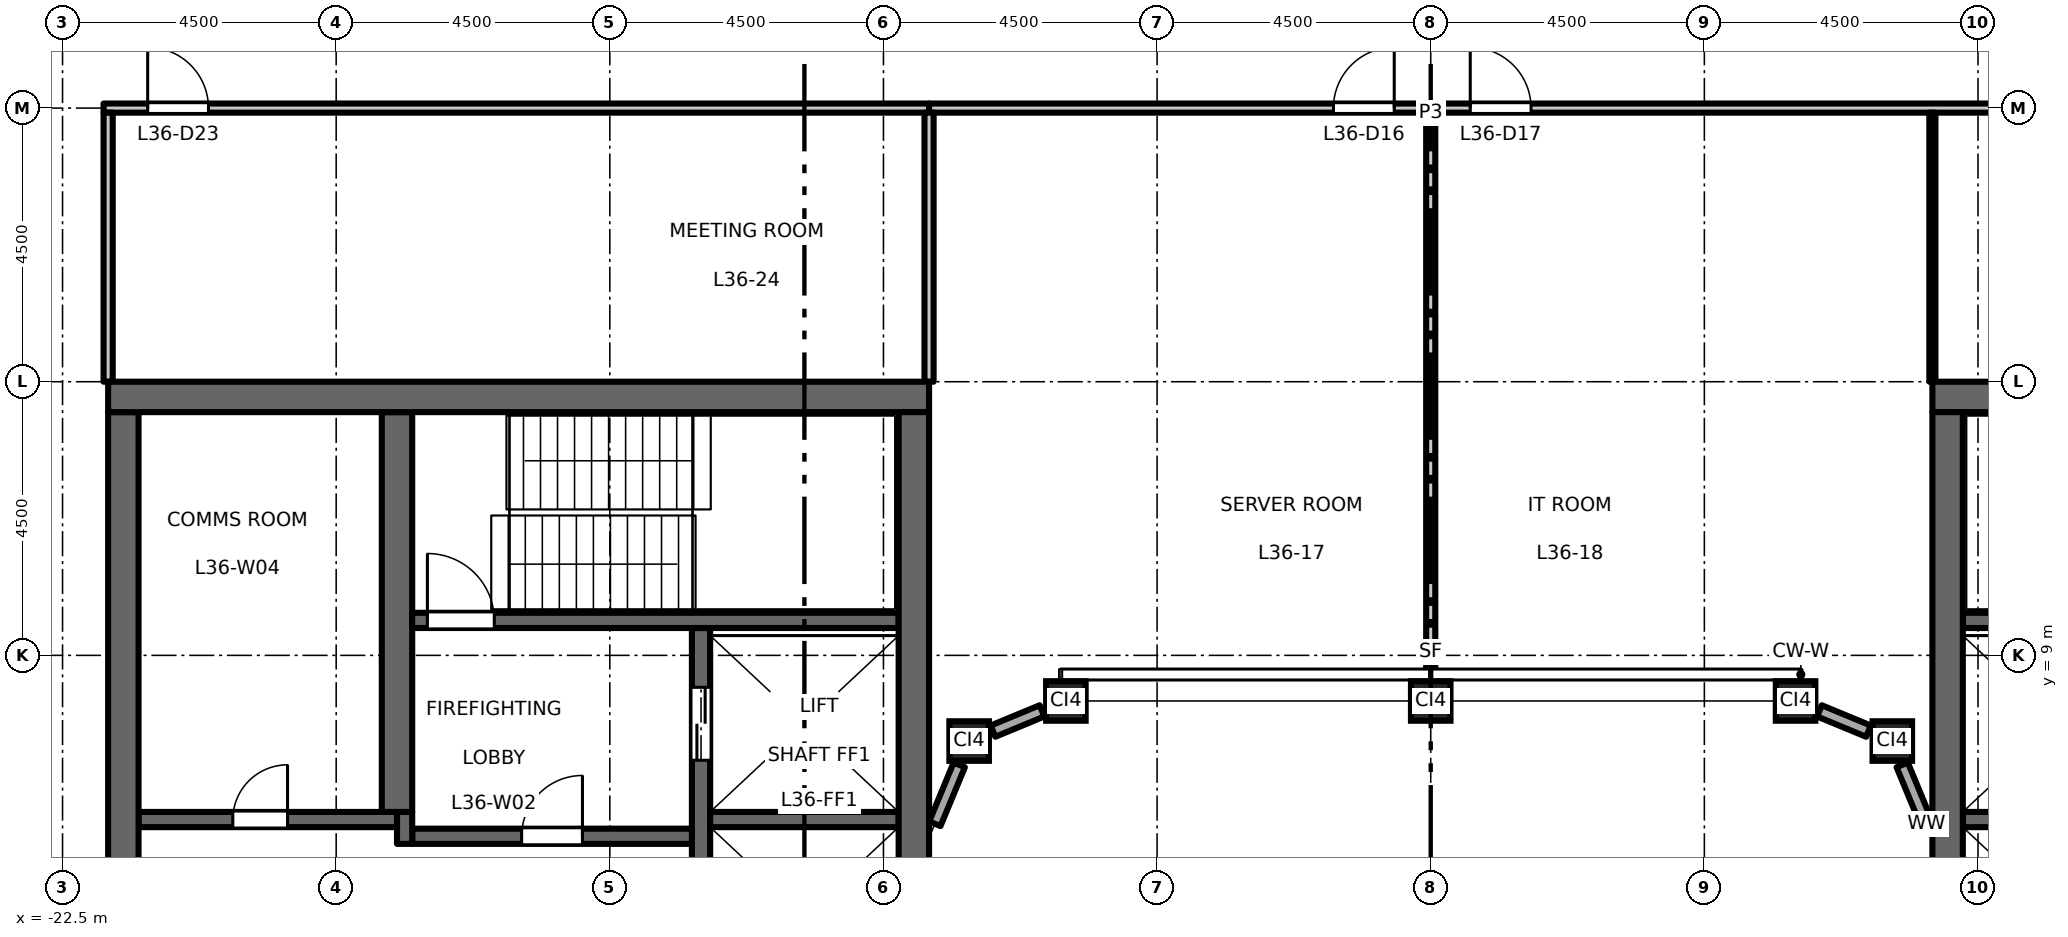
"""IFC4 building model, lengths in metres.
Left out: names, types, materials, properties, quantities, classifications, styles, units other than length and angle.
Written with IfcOpenShell. Run it as: python <this file> out.ifc"""

import sys

from ifc_helpers import new_model, si_unit, direction, frame, frame_2d, origin, origin_2d, place, context, subcontext, project, spatial, rectangle, hollow_rectangle, extrude, element, fill, save


model = new_model("IFC4")
c1 = context("Model", 3, precision=1e-05, world=origin(), true_north=direction((0.0, 1.0)))
c2 = subcontext(c1, "Body", "Model", "MODEL_VIEW")
j1 = project(units=[si_unit("LENGTHUNIT", "METRE"), si_unit("PLANEANGLEUNIT", "RADIAN")], contexts=[c1])
p1 = place(None, origin())
s1 = spatial("IfcSite", under=j1, at=p1, CompositionType="ELEMENT")
p2 = place(p1, origin())
s2 = spatial("IfcBuilding", under=s1, at=p2, CompositionType="ELEMENT")
p3 = place(p2, frame((0.0, 0.0, 167.7)))
s3 = spatial("IfcBuildingStorey", under=s2, at=p3, CompositionType="ELEMENT", Elevation=167.7)
for number, where, z_axis, x_axis in (
    (1, (-7.591, 7.591, 0.0), (0.0, 0.0, 1.0), (1.0, 0.0, 0.0)),
    (2, (-6.0, 8.25, 0.0), (0.0, 0.0, 1.0), (1.0, 0.0, 0.0)),
    (3, (0.0, 8.25, 0.0), (0.0, 0.0, 1.0), (1.0, 0.0, 0.0)),
    (4, (6.0, 8.25, 0.0), (0.0, 0.0, 1.0), (1.0, 0.0, 0.0)),
    (5, (7.591, 7.591, 0.0), (0.0, 0.0, 1.0), (1.0, 0.0, 0.0)),
):
    element("IfcColumn", number, at=place(p3, frame(where, z_axis=z_axis, x_axis=x_axis)), inside=s3, PredefinedType="COLUMN", context=c2, shape_type="SweptSolid", body=[
        extrude(hollow_rectangle(XDim=0.65, YDim=0.65, WallThickness=0.036, at=origin_2d()), origin(), (0.0, 0.0, 1.0), 4.5),
    ])
p4 = place(p3, frame((-12.0, -9.45, 0.0), z_axis=(0.0, 0.0, 1.0), x_axis=(0.0, 1.0, 0.0)))
e6 = element("IfcWall", 6, at=p4, inside=s3, PredefinedType="SHEAR", context=c2, shape_type="SweptSolid", body=[
    extrude(rectangle(XDim=18.9, YDim=0.3, at=frame_2d((9.45, 0.0))), origin(), (0.0, 0.0, 1.0), 4.35),
])
p5 = place(p4, frame((3.625, 0.0, 0.0)))
e7 = element("IfcOpeningElement", 7, at=p5, cuts=e6, PredefinedType="OPENING", context=c2, shape_type="SweptSolid", body=[
    extrude(rectangle(XDim=1.1, YDim=2.1, at=frame_2d((0.55, 1.05))), frame((0.0, 0.16, 0.0), z_axis=(0.0, -1.0, 0.0), x_axis=(1.0, 0.0, 0.0)), (0.0, 0.0, 1.0), 0.32),
])
p6 = place(p4, frame((6.775, 0.0, 0.0)))
e8 = element("IfcOpeningElement", 8, at=p6, cuts=e6, PredefinedType="OPENING", context=c2, shape_type="SweptSolid", body=[
    extrude(rectangle(XDim=1.1, YDim=2.1, at=frame_2d((0.55, 1.05))), frame((0.0, 0.16, 0.0), z_axis=(0.0, -1.0, 0.0), x_axis=(1.0, 0.0, 0.0)), (0.0, 0.0, 1.0), 0.32),
])
p7 = place(p4, frame((9.925, 0.0, 0.0)))
e9 = element("IfcOpeningElement", 9, at=p7, cuts=e6, PredefinedType="OPENING", context=c2, shape_type="SweptSolid", body=[
    extrude(rectangle(XDim=1.1, YDim=2.1, at=frame_2d((0.55, 1.05))), frame((0.0, 0.16, 0.0), z_axis=(0.0, -1.0, 0.0), x_axis=(1.0, 0.0, 0.0)), (0.0, 0.0, 1.0), 0.32),
])
p8 = place(p4, frame((13.075, 0.0, 0.0)))
e10 = element("IfcOpeningElement", 10, at=p8, cuts=e6, PredefinedType="OPENING", context=c2, shape_type="SweptSolid", body=[
    extrude(rectangle(XDim=1.1, YDim=2.1, at=frame_2d((0.55, 1.05))), frame((0.0, 0.16, 0.0), z_axis=(0.0, -1.0, 0.0), x_axis=(1.0, 0.0, 0.0)), (0.0, 0.0, 1.0), 0.32),
])
p9 = place(p4, frame((16.725, 0.0, 0.0)))
e11 = element("IfcOpeningElement", 11, at=p9, cuts=e6, PredefinedType="OPENING", context=c2, shape_type="SweptSolid", body=[
    extrude(rectangle(XDim=1.2, YDim=2.1, at=frame_2d((0.6, 1.05))), frame((0.0, 0.16, 0.0), z_axis=(0.0, -1.0, 0.0), x_axis=(1.0, 0.0, 0.0)), (0.0, 0.0, 1.0), 0.32),
])
p10 = place(p4, frame((0.975, 0.0, 0.0)))
e12 = element("IfcOpeningElement", 12, at=p10, cuts=e6, PredefinedType="OPENING", context=c2, shape_type="SweptSolid", body=[
    extrude(rectangle(XDim=1.2, YDim=2.1, at=frame_2d((0.6, 1.05))), frame((0.0, 0.16, 0.0), z_axis=(0.0, -1.0, 0.0), x_axis=(1.0, 0.0, 0.0)), (0.0, 0.0, 1.0), 0.32),
])
p11 = place(p3, frame((-12.15, 6.025, 0.0), z_axis=(0.0, 0.0, 1.0), x_axis=(-1.0, 0.0, 0.0)))
e13 = element("IfcWall", 13, at=p11, inside=s3, PredefinedType="SHEAR", context=c2, shape_type="SweptSolid", body=[
    extrude(rectangle(XDim=4.6, YDim=0.25, at=frame_2d((2.3, 0.0))), origin(), (0.0, 0.0, 1.0), 4.35),
])
p12 = place(p11, frame((1.8, 0.0, 0.0)))
e14 = element("IfcOpeningElement", 14, at=p12, cuts=e13, PredefinedType="OPENING", context=c2, shape_type="SweptSolid", body=[
    extrude(rectangle(XDim=1.0, YDim=2.1, at=frame_2d((0.5, 1.05))), frame((0.0, 0.135, 0.0), z_axis=(0.0, -1.0, 0.0), x_axis=(1.0, 0.0, 0.0)), (0.0, 0.0, 1.0), 0.27),
])
p13 = place(p3, frame((-16.875, 5.9, 0.0), z_axis=(0.0, 0.0, 1.0), x_axis=(0.0, 1.0, 0.0)))
e15 = element("IfcWall", 15, at=p13, inside=s3, PredefinedType="SHEAR", context=c2, shape_type="SweptSolid", body=[
    extrude(rectangle(XDim=0.525, YDim=0.25, at=frame_2d((0.263, 0.0))), origin(), (0.0, 0.0, 1.0), 4.35),
])
p14 = place(p3, frame((-17.0, 6.3, 0.0), z_axis=(0.0, 0.0, 1.0), x_axis=(-1.0, 0.0, 0.0)))
e16 = element("IfcWall", 16, at=p14, inside=s3, PredefinedType="SHEAR", context=c2, shape_type="SweptSolid", body=[
    extrude(rectangle(XDim=4.25, YDim=0.25, at=frame_2d((2.125, 0.0))), origin(), (0.0, 0.0, 1.0), 4.35),
])
p15 = place(p14, frame((1.8, 0.0, 0.0)))
e17 = element("IfcOpeningElement", 17, at=p15, cuts=e16, PredefinedType="OPENING", context=c2, shape_type="SweptSolid", body=[
    extrude(rectangle(XDim=0.9, YDim=2.1, at=frame_2d((0.45, 1.05))), frame((0.0, 0.135, 0.0), z_axis=(0.0, -1.0, 0.0), x_axis=(1.0, 0.0, 0.0)), (0.0, 0.0, 1.0), 0.27),
])
p16 = place(p3, frame((-21.5, -13.0, 0.0), z_axis=(0.0, 0.0, 1.0), x_axis=(0.0, 1.0, 0.0)))
e18 = element("IfcWall", 18, at=p16, inside=s3, PredefinedType="SHEAR", context=c2, shape_type="SweptSolid", body=[
    extrude(rectangle(XDim=26.0, YDim=0.5, at=frame_2d((13.0, 0.0))), origin(), (0.0, 0.0, 1.0), 4.35),
])
p17 = place(p16, frame((16.825, 0.0, 0.0)))
e19 = element("IfcOpeningElement", 19, at=p17, cuts=e18, PredefinedType="OPENING", context=c2, shape_type="SweptSolid", body=[
    extrude(rectangle(XDim=1.8, YDim=2.1, at=frame_2d((0.9, 1.05))), frame((0.0, 0.26, 0.0), z_axis=(0.0, -1.0, 0.0), x_axis=(1.0, 0.0, 0.0)), (0.0, 0.0, 1.0), 0.52),
])
p18 = place(p16, frame((7.375, 0.0, 0.0)))
e20 = element("IfcOpeningElement", 20, at=p18, cuts=e18, PredefinedType="OPENING", context=c2, shape_type="SweptSolid", body=[
    extrude(rectangle(XDim=1.8, YDim=2.1, at=frame_2d((0.9, 1.05))), frame((0.0, 0.26, 0.0), z_axis=(0.0, -1.0, 0.0), x_axis=(1.0, 0.0, 0.0)), (0.0, 0.0, 1.0), 0.52),
])
p19 = place(p16, frame((2.65, 0.0, 0.0)))
e21 = element("IfcOpeningElement", 21, at=p19, cuts=e18, PredefinedType="OPENING", context=c2, shape_type="SweptSolid", body=[
    extrude(rectangle(XDim=0.9, YDim=2.1, at=frame_2d((0.45, 1.05))), frame((0.0, 0.26, 0.0), z_axis=(0.0, -1.0, 0.0), x_axis=(1.0, 0.0, 0.0)), (0.0, 0.0, 1.0), 0.52),
])
p20 = place(p3, frame((-17.0, 6.425, 0.0), z_axis=(0.0, 0.0, 1.0), x_axis=(0.0, 1.0, 0.0)))
e22 = element("IfcWall", 22, at=p20, inside=s3, PredefinedType="SHEAR", context=c2, shape_type="SweptSolid", body=[
    extrude(rectangle(XDim=6.575, YDim=0.5, at=frame_2d((3.288, 0.0))), origin(), (0.0, 0.0, 1.0), 4.35),
])
p21 = place(p3, frame((-8.75, 6.3, 0.0), z_axis=(0.0, 0.0, 1.0), x_axis=(-1.0, 0.0, 0.0)))
e23 = element("IfcWall", 23, at=p21, inside=s3, PredefinedType="SHEAR", context=c2, shape_type="SweptSolid", body=[
    extrude(rectangle(XDim=3.1, YDim=0.25, at=frame_2d((1.55, 0.0))), origin(), (0.0, 0.0, 1.0), 4.35),
])
p22 = place(p3, frame((-8.75, 9.575, 0.0), z_axis=(0.0, 0.0, 1.0), x_axis=(-1.0, 0.0, 0.0)))
e24 = element("IfcWall", 24, at=p22, inside=s3, PredefinedType="SHEAR", context=c2, shape_type="SweptSolid", body=[
    extrude(rectangle(XDim=8.0, YDim=0.25, at=frame_2d((4.0, 0.0))), origin(), (0.0, 0.0, 1.0), 4.35),
])
p23 = place(p22, frame((6.65, 0.0, 0.0)))
e25 = element("IfcOpeningElement", 25, at=p23, cuts=e24, PredefinedType="OPENING", context=c2, shape_type="SweptSolid", body=[
    extrude(rectangle(XDim=1.1, YDim=2.1, at=frame_2d((0.55, 1.05))), frame((0.0, 0.135, 0.0), z_axis=(0.0, -1.0, 0.0), x_axis=(1.0, 0.0, 0.0)), (0.0, 0.0, 1.0), 0.27),
])
p24 = place(p3, frame((-8.25, 13.25, 0.0), z_axis=(0.0, 0.0, 1.0), x_axis=(-1.0, 0.0, 0.0)))
e26 = element("IfcWall", 26, at=p24, inside=s3, PredefinedType="SHEAR", context=c2, shape_type="SweptSolid", body=[
    extrude(rectangle(XDim=13.5, YDim=0.5, at=frame_2d((6.75, 0.0))), origin(), (0.0, 0.0, 1.0), 4.35),
])
p25 = place(p3, frame((-8.5, -13.0, 0.0), z_axis=(0.0, 0.0, 1.0), x_axis=(0.0, 1.0, 0.0)))
e27 = element("IfcWall", 27, at=p25, inside=s3, PredefinedType="SHEAR", context=c2, shape_type="SweptSolid", body=[
    extrude(rectangle(XDim=26.0, YDim=0.5, at=frame_2d((13.0, 0.0))), origin(), (0.0, 0.0, 1.0), 4.35),
])
p26 = place(p3, frame((8.75, 6.3, 0.0), z_axis=(0.0, 0.0, 1.0), x_axis=(1.0, 0.0, 0.0)))
e28 = element("IfcWall", 28, at=p26, inside=s3, PredefinedType="SHEAR", context=c2, shape_type="SweptSolid", body=[
    extrude(rectangle(XDim=3.1, YDim=0.25, at=frame_2d((1.55, 0.0))), origin(), (0.0, 0.0, 1.0), 4.35),
])
p27 = place(p3, frame((8.75, 9.575, 0.0), z_axis=(0.0, 0.0, 1.0), x_axis=(1.0, 0.0, 0.0)))
e29 = element("IfcWall", 29, at=p27, inside=s3, PredefinedType="SHEAR", context=c2, shape_type="SweptSolid", body=[
    extrude(rectangle(XDim=8.0, YDim=0.25, at=frame_2d((4.0, 0.0))), origin(), (0.0, 0.0, 1.0), 4.35),
])
p28 = place(p27, frame((6.65, 0.0, 0.0)))
e30 = element("IfcOpeningElement", 30, at=p28, cuts=e29, PredefinedType="OPENING", context=c2, shape_type="SweptSolid", body=[
    extrude(rectangle(XDim=1.1, YDim=2.1, at=frame_2d((0.55, 1.05))), frame((0.0, 0.135, 0.0), z_axis=(0.0, -1.0, 0.0), x_axis=(1.0, 0.0, 0.0)), (0.0, 0.0, 1.0), 0.27),
])
p29 = place(p3, frame((8.25, 13.25, 0.0), z_axis=(0.0, 0.0, 1.0), x_axis=(1.0, 0.0, 0.0)))
e31 = element("IfcWall", 31, at=p29, inside=s3, PredefinedType="SHEAR", context=c2, shape_type="SweptSolid", body=[
    extrude(rectangle(XDim=13.5, YDim=0.5, at=frame_2d((6.75, 0.0))), origin(), (0.0, 0.0, 1.0), 4.35),
])
p30 = place(p3, frame((8.5, -13.0, 0.0), z_axis=(0.0, 0.0, 1.0), x_axis=(0.0, 1.0, 0.0)))
e32 = element("IfcWall", 32, at=p30, inside=s3, PredefinedType="SHEAR", context=c2, shape_type="SweptSolid", body=[
    extrude(rectangle(XDim=26.0, YDim=0.5, at=frame_2d((13.0, 0.0))), origin(), (0.0, 0.0, 1.0), 4.35),
])
p31 = place(p3, frame((8.154, 6.231, 0.0), z_axis=(0.0, 0.0, 1.0), x_axis=(-0.382694858887, 0.923874799408, 0.0)))
e33 = element("IfcWall", 33, at=p31, inside=s3, PredefinedType="STANDARD", context=c2, shape_type="SweptSolid", body=[
    extrude(rectangle(XDim=1.048, YDim=0.2, at=frame_2d((0.524, 0.0))), origin(), (0.0, 0.0, 1.0), 3.826),
])
for number, where, z_axis, x_axis in (
    (34, (7.199, 7.753, 0.0), (0.0, 0.0, 1.0), (-0.924, 0.383, 0.0)),
    (35, (-6.392, 8.087, 0.0), (0.0, 0.0, 1.0), (-0.924, -0.383, 0.0)),
):
    element("IfcWall", number, at=place(p3, frame(where, z_axis=z_axis, x_axis=x_axis)), inside=s3, PredefinedType="STANDARD", context=c2, shape_type="SweptSolid", body=[
        extrude(rectangle(XDim=0.873, YDim=0.2, at=frame_2d((0.437, 0.0))), origin(), (0.0, 0.0, 1.0), 3.826),
    ])
p32 = place(p3, frame((-7.753, 7.199, 0.0), z_axis=(0.0, 0.0, 1.0), x_axis=(-0.382694858887, -0.923874799408, 0.0)))
e36 = element("IfcWall", 36, at=p32, inside=s3, PredefinedType="STANDARD", context=c2, shape_type="SweptSolid", body=[
    extrude(rectangle(XDim=1.048, YDim=0.2, at=frame_2d((0.524, 0.0))), origin(), (0.0, 0.0, 1.0), 3.826),
])
p33 = place(p3, frame((-21.825, 18.0, 0.0), z_axis=(0.0, 0.0, 1.0), x_axis=(1.0, 0.0, 0.0)))
e37 = element("IfcWall", 37, at=p33, inside=s3, PredefinedType="PARTITIONING", context=c2, shape_type="SweptSolid", body=[
    extrude(rectangle(XDim=13.575, YDim=0.15, at=frame_2d((6.788, 0.0))), origin(), (0.0, 0.0, 1.0), 4.35),
])
p34 = place(p33, frame((0.725, 0.0, 0.0)))
e38 = element("IfcOpeningElement", 38, at=p34, cuts=e37, PredefinedType="OPENING", context=c2, shape_type="SweptSolid", body=[
    extrude(rectangle(XDim=1.0, YDim=2.1, at=frame_2d((0.5, 1.05))), frame((0.0, 0.085, 0.0), z_axis=(0.0, -1.0, 0.0), x_axis=(1.0, 0.0, 0.0)), (0.0, 0.0, 1.0), 0.17),
])
p35 = place(p3, frame((0.0, 18.0, 0.0), z_axis=(0.0, 0.0, 1.0), x_axis=(1.0, 0.0, 0.0)))
e39 = element("IfcWall", 39, at=p35, inside=s3, PredefinedType="PARTITIONING", context=c2, shape_type="SweptSolid", body=[
    extrude(rectangle(XDim=21.825, YDim=0.15, at=frame_2d((10.913, 0.0))), origin(), (0.0, 0.0, 1.0), 4.35),
])
p36 = place(p35, frame((0.65, 0.0, 0.0)))
e40 = element("IfcOpeningElement", 40, at=p36, cuts=e39, PredefinedType="OPENING", context=c2, shape_type="SweptSolid", body=[
    extrude(rectangle(XDim=1.0, YDim=2.1, at=frame_2d((0.5, 1.05))), frame((0.0, 0.085, 0.0), z_axis=(0.0, -1.0, 0.0), x_axis=(1.0, 0.0, 0.0)), (0.0, 0.0, 1.0), 0.17),
])
p37 = place(p35, frame((20.15, 0.0, 0.0)))
e41 = element("IfcOpeningElement", 41, at=p37, cuts=e39, PredefinedType="OPENING", context=c2, shape_type="SweptSolid", body=[
    extrude(rectangle(XDim=1.0, YDim=2.1, at=frame_2d((0.5, 1.05))), frame((0.0, 0.085, 0.0), z_axis=(0.0, -1.0, 0.0), x_axis=(1.0, 0.0, 0.0)), (0.0, 0.0, 1.0), 0.17),
])
p38 = place(p3, frame((-8.25, 18.0, 0.0), z_axis=(0.0, 0.0, 1.0), x_axis=(1.0, 0.0, 0.0)))
e42 = element("IfcWall", 42, at=p38, inside=s3, PredefinedType="PARTITIONING", context=c2, shape_type="SweptSolid", body=[
    extrude(rectangle(XDim=8.25, YDim=0.15, at=frame_2d((4.125, 0.0))), origin(), (0.0, 0.0, 1.0), 4.35),
])
p39 = place(p38, frame((6.65, 0.0, 0.0)))
e43 = element("IfcOpeningElement", 43, at=p39, cuts=e42, PredefinedType="OPENING", context=c2, shape_type="SweptSolid", body=[
    extrude(rectangle(XDim=1.0, YDim=2.1, at=frame_2d((0.5, 1.05))), frame((0.0, 0.085, 0.0), z_axis=(0.0, -1.0, 0.0), x_axis=(1.0, 0.0, 0.0)), (0.0, 0.0, 1.0), 0.17),
])
for number, where, z_axis, x_axis in (
    (44, (-21.75, 13.5, 0.0), (0.0, 0.0, 1.0), (0.0, 1.0, 0.0)),
    (45, (-8.25, 13.5, 0.0), (0.0, 0.0, 1.0), (0.0, 1.0, 0.0)),
):
    element("IfcWall", number, at=place(p3, frame(where, z_axis=z_axis, x_axis=x_axis)), inside=s3, PredefinedType="PARTITIONING", context=c2, shape_type="SweptSolid", body=[
        extrude(rectangle(XDim=4.425, YDim=0.15, at=frame_2d((2.212, 0.0))), origin(), (0.0, 0.0, 1.0), 4.35),
    ])
p40 = place(p3, frame((0.0, 8.65, 0.0), z_axis=(0.0, 0.0, 1.0), x_axis=(0.0, 1.0, 0.0)))
e46 = element("IfcWall", 46, at=p40, inside=s3, PredefinedType="PARTITIONING", context=c2, shape_type="SweptSolid", body=[
    extrude(rectangle(XDim=9.275, YDim=0.15, at=frame_2d((4.638, 0.0))), origin(), (0.0, 0.0, 1.0), 3.45),
])
p41 = place(p3, frame((8.25, 13.5, 0.0), z_axis=(0.0, 0.0, 1.0), x_axis=(0.0, 1.0, 0.0)))
e47 = element("IfcWall", 47, at=p41, inside=s3, PredefinedType="PARTITIONING", context=c2, shape_type="SweptSolid", body=[
    extrude(rectangle(XDim=4.425, YDim=0.1, at=frame_2d((2.212, 0.0))), origin(), (0.0, 0.0, 1.0), 4.35),
])
p42 = place(p12, origin())
e48 = element("IfcDoor", 48, at=p42, inside=s3, OperationType="SINGLE_SWING_LEFT", PredefinedType="DOOR", context=c2, shape_type="SweptSolid", body=[
    extrude(rectangle(XDim=1.0, YDim=2.1, at=frame_2d((0.5, 1.05))), frame((0.0, 0.025, 0.0), z_axis=(0.0, -1.0, 0.0), x_axis=(1.0, 0.0, 0.0)), (0.0, 0.0, 1.0), 0.05),
])
fill(e14, e48)
p43 = place(p23, origin())
e49 = element("IfcDoor", 49, at=p43, inside=s3, OperationType="SINGLE_SWING_RIGHT", PredefinedType="DOOR", context=c2, shape_type="SweptSolid", body=[
    extrude(rectangle(XDim=1.1, YDim=2.1, at=frame_2d((0.55, 1.05))), frame((0.0, 0.025, 0.0), z_axis=(0.0, -1.0, 0.0), x_axis=(1.0, 0.0, 0.0)), (0.0, 0.0, 1.0), 0.05),
])
fill(e25, e49)
p44 = place(p9, origin())
e50 = element("IfcDoor", 50, at=p44, inside=s3, OperationType="DOUBLE_DOOR_SLIDING", PredefinedType="DOOR", context=c2, shape_type="SweptSolid", body=[
    extrude(rectangle(XDim=1.2, YDim=2.1, at=frame_2d((0.6, 1.05))), frame((0.0, 0.025, 0.0), z_axis=(0.0, -1.0, 0.0), x_axis=(1.0, 0.0, 0.0)), (0.0, 0.0, 1.0), 0.05),
])
fill(e11, e50)
p45 = place(p15, origin())
e51 = element("IfcDoor", 51, at=p45, inside=s3, OperationType="SINGLE_SWING_LEFT", PredefinedType="DOOR", context=c2, shape_type="SweptSolid", body=[
    extrude(rectangle(XDim=0.9, YDim=2.1, at=frame_2d((0.45, 1.05))), frame((0.0, 0.025, 0.0), z_axis=(0.0, -1.0, 0.0), x_axis=(1.0, 0.0, 0.0)), (0.0, 0.0, 1.0), 0.05),
])
fill(e17, e51)
p46 = place(p39, origin())
e52 = element("IfcDoor", 52, at=p46, inside=s3, OperationType="SINGLE_SWING_RIGHT", PredefinedType="DOOR", context=c2, shape_type="SweptSolid", body=[
    extrude(rectangle(XDim=1.0, YDim=2.1, at=frame_2d((0.5, 1.05))), frame((0.0, 0.025, 0.0), z_axis=(0.0, -1.0, 0.0), x_axis=(1.0, 0.0, 0.0)), (0.0, 0.0, 1.0), 0.05),
])
fill(e43, e52)
p47 = place(p36, origin())
e53 = element("IfcDoor", 53, at=p47, inside=s3, OperationType="SINGLE_SWING_LEFT", PredefinedType="DOOR", context=c2, shape_type="SweptSolid", body=[
    extrude(rectangle(XDim=1.0, YDim=2.1, at=frame_2d((0.5, 1.05))), frame((0.0, 0.025, 0.0), z_axis=(0.0, -1.0, 0.0), x_axis=(1.0, 0.0, 0.0)), (0.0, 0.0, 1.0), 0.05),
])
fill(e40, e53)
p48 = place(p34, origin())
e54 = element("IfcDoor", 54, at=p48, inside=s3, OperationType="SINGLE_SWING_LEFT", PredefinedType="DOOR", context=c2, shape_type="SweptSolid", body=[
    extrude(rectangle(XDim=1.0, YDim=2.1, at=frame_2d((0.5, 1.05))), frame((0.0, 0.025, 0.0), z_axis=(0.0, -1.0, 0.0), x_axis=(1.0, 0.0, 0.0)), (0.0, 0.0, 1.0), 0.05),
])
fill(e38, e54)
save(model, sys.argv[1])
